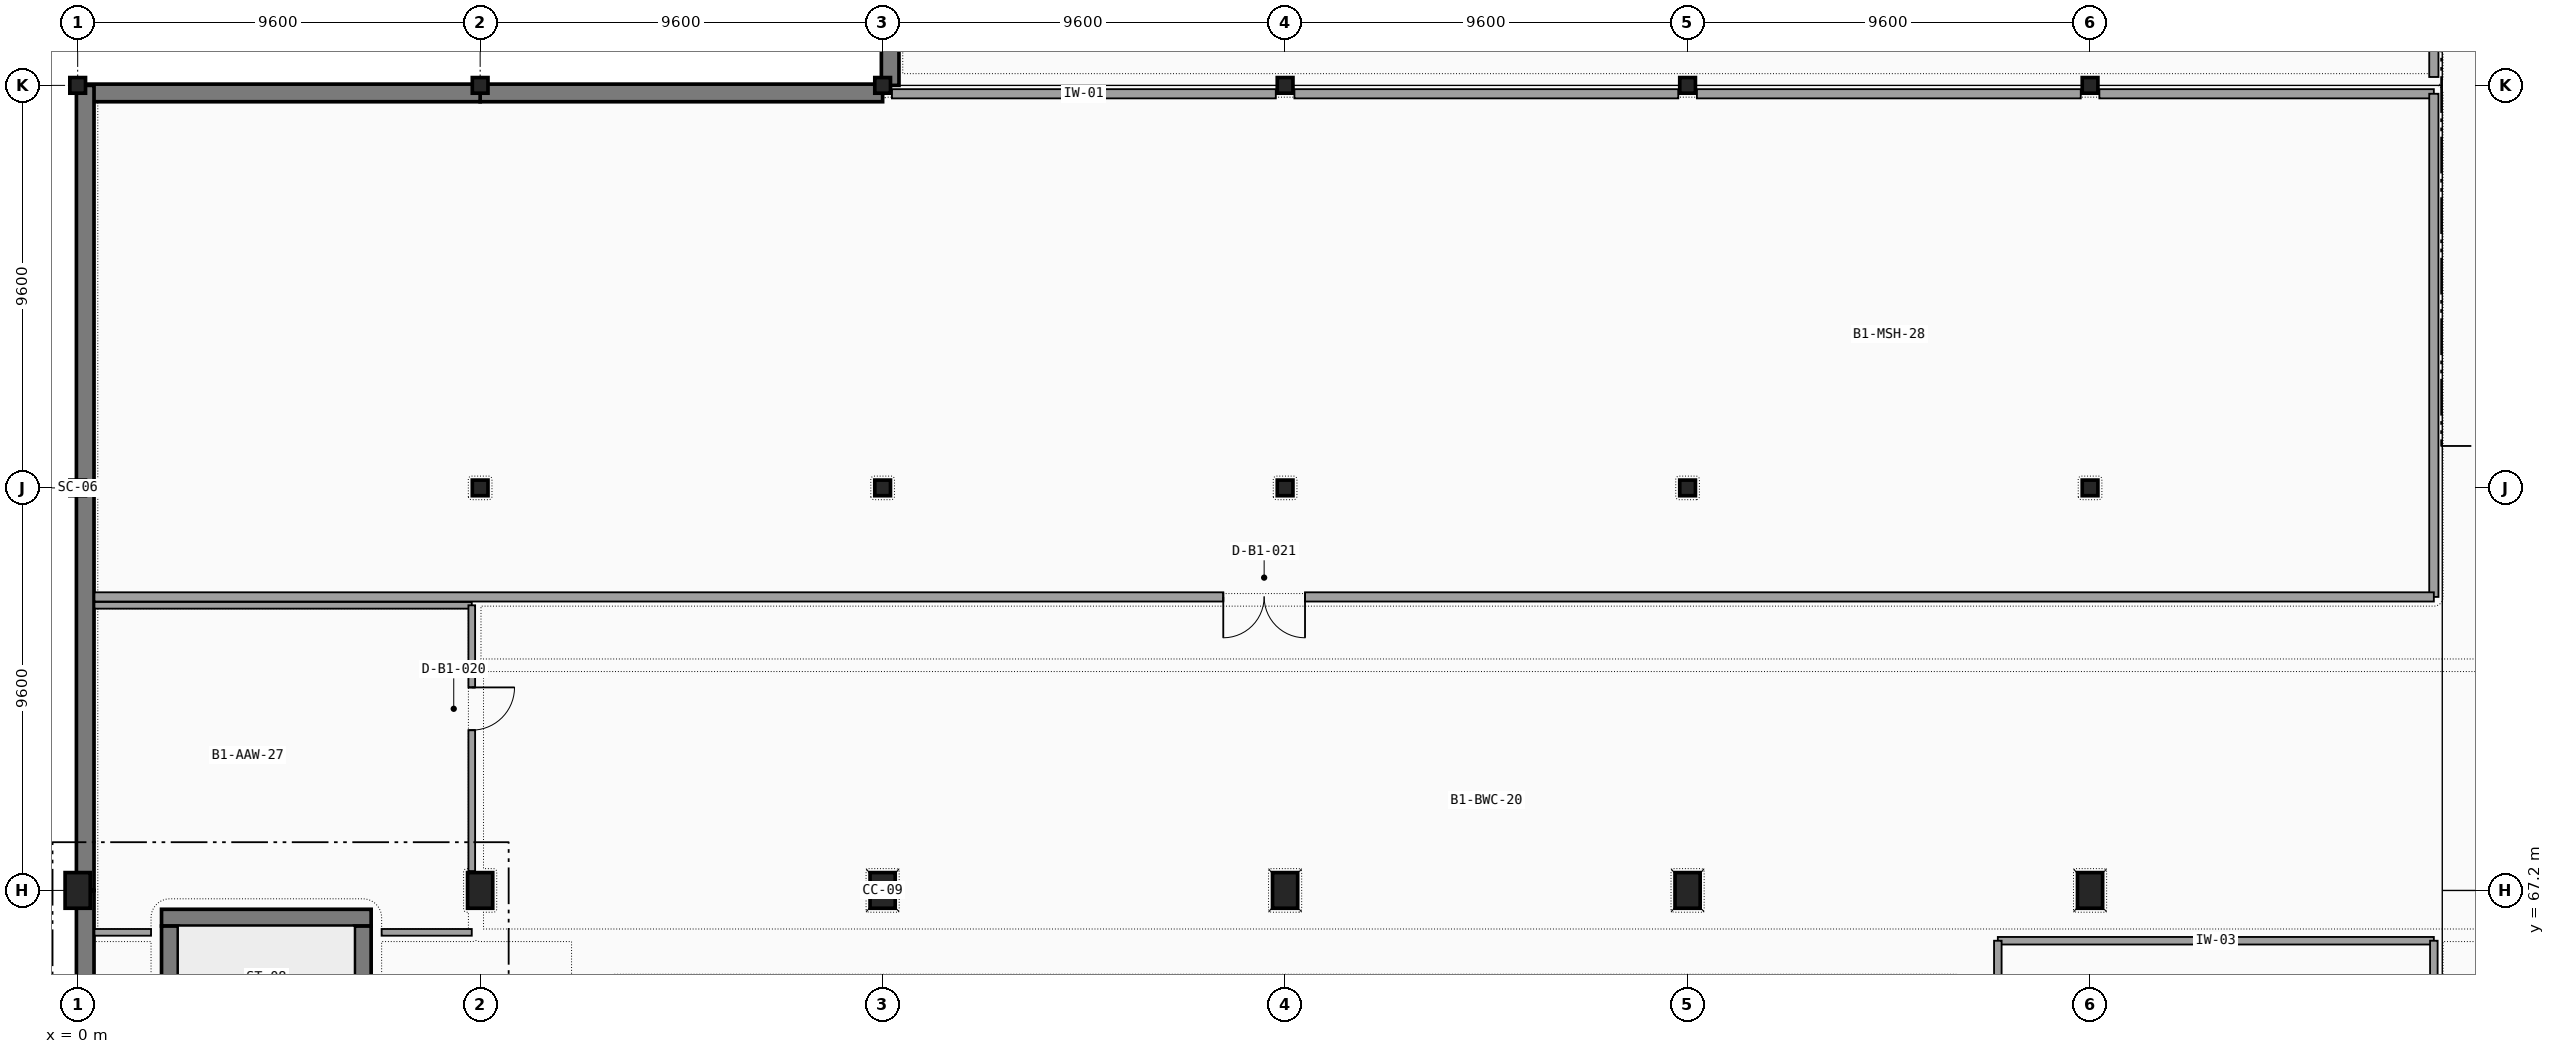
"""IFC4 building model, lengths in metres.
Left out: names, types, materials, properties, quantities, classifications, styles, units other than length and angle.
Written with IfcOpenShell. Run it as: python <this file> out.ifc"""

import sys

from ifc_helpers import new_model, si_unit, direction, frame, frame_2d, origin, origin_2d, place, context, subcontext, project, spatial, rectangle, i_section, extrude, element, fill, save


model = new_model("IFC4")
c1 = context("Model", 3, precision=1e-05, world=origin(), true_north=direction((0.0, 1.0)))
c2 = subcontext(c1, "Body", "Model", "MODEL_VIEW")
j1 = project(units=[si_unit("LENGTHUNIT", "METRE"), si_unit("PLANEANGLEUNIT", "RADIAN")], contexts=[c1])
p1 = place(None, origin())
s1 = spatial("IfcSite", under=j1, at=p1, CompositionType="ELEMENT")
p2 = place(p1, origin())
s2 = spatial("IfcBuilding", under=s1, at=p2, CompositionType="ELEMENT")
p3 = place(p2, frame((0.0, 0.0, -4.8)))
s3 = spatial("IfcBuildingStorey", under=s2, at=p3, CompositionType="ELEMENT", Elevation=-4.8)
p4 = place(p3, frame((0.0, 67.2, 0.0), z_axis=(0.0, 0.0, 1.0), x_axis=(1.0, 0.0, 0.0)))
e1 = element("IfcColumn", 1, at=p4, inside=s3, PredefinedType="COLUMN", context=c2, shape_type="SweptSolid", body=[
    extrude(rectangle(XDim=0.6, YDim=0.85, at=origin_2d()), origin(), (0.0, 0.0, 1.0), 4.8),
])
for number, where, z_axis, x_axis in (
    (2, (0.0, 76.8, 0.0), (0.0, 0.0, 1.0), (1.0, 0.0, 0.0)),
    (3, (0.0, 86.4, 0.0), (0.0, 0.0, 1.0), (1.0, 0.0, 0.0)),
):
    element("IfcColumn", number, at=place(p3, frame(where, z_axis=z_axis, x_axis=x_axis)), inside=s3, PredefinedType="COLUMN", context=c2, shape_type="SweptSolid", body=[
        extrude(i_section(OverallWidth=0.374, OverallDepth=0.372, WebThickness=0.016, FlangeThickness=0.026, FilletRadius=0.015, at=origin_2d()), origin(), (0.0, 0.0, 1.0), 4.8),
    ])
p5 = place(p3, frame((9.6, 67.2, 0.0), z_axis=(0.0, 0.0, 1.0), x_axis=(1.0, 0.0, 0.0)))
e4 = element("IfcColumn", 4, at=p5, inside=s3, PredefinedType="COLUMN", context=c2, shape_type="SweptSolid", body=[
    extrude(rectangle(XDim=0.6, YDim=0.85, at=origin_2d()), origin(), (0.0, 0.0, 1.0), 4.8),
])
for number, where, z_axis, x_axis in (
    (5, (9.6, 76.8, 0.0), (0.0, 0.0, 1.0), (1.0, 0.0, 0.0)),
    (6, (9.6, 86.4, 0.0), (0.0, 0.0, 1.0), (1.0, 0.0, 0.0)),
):
    element("IfcColumn", number, at=place(p3, frame(where, z_axis=z_axis, x_axis=x_axis)), inside=s3, PredefinedType="COLUMN", context=c2, shape_type="SweptSolid", body=[
        extrude(i_section(OverallWidth=0.374, OverallDepth=0.372, WebThickness=0.016, FlangeThickness=0.026, FilletRadius=0.015, at=origin_2d()), origin(), (0.0, 0.0, 1.0), 4.8),
    ])
p6 = place(p3, frame((19.2, 67.2, 0.0), z_axis=(0.0, 0.0, 1.0), x_axis=(1.0, 0.0, 0.0)))
e7 = element("IfcColumn", 7, at=p6, inside=s3, PredefinedType="COLUMN", context=c2, shape_type="SweptSolid", body=[
    extrude(rectangle(XDim=0.6, YDim=0.85, at=origin_2d()), origin(), (0.0, 0.0, 1.0), 4.8),
])
for number, where, z_axis, x_axis in (
    (8, (19.2, 76.8, 0.0), (0.0, 0.0, 1.0), (1.0, 0.0, 0.0)),
    (9, (19.2, 86.4, 0.0), (0.0, 0.0, 1.0), (1.0, 0.0, 0.0)),
):
    element("IfcColumn", number, at=place(p3, frame(where, z_axis=z_axis, x_axis=x_axis)), inside=s3, PredefinedType="COLUMN", context=c2, shape_type="SweptSolid", body=[
        extrude(i_section(OverallWidth=0.374, OverallDepth=0.372, WebThickness=0.016, FlangeThickness=0.026, FilletRadius=0.015, at=origin_2d()), origin(), (0.0, 0.0, 1.0), 4.8),
    ])
p7 = place(p3, frame((28.8, 67.2, 0.0), z_axis=(0.0, 0.0, 1.0), x_axis=(1.0, 0.0, 0.0)))
e10 = element("IfcColumn", 10, at=p7, inside=s3, PredefinedType="COLUMN", context=c2, shape_type="SweptSolid", body=[
    extrude(rectangle(XDim=0.6, YDim=0.85, at=origin_2d()), origin(), (0.0, 0.0, 1.0), 4.8),
])
for number, where, z_axis, x_axis in (
    (11, (28.8, 76.8, 0.0), (0.0, 0.0, 1.0), (1.0, 0.0, 0.0)),
    (12, (28.8, 86.4, 0.0), (0.0, 0.0, 1.0), (1.0, 0.0, 0.0)),
):
    element("IfcColumn", number, at=place(p3, frame(where, z_axis=z_axis, x_axis=x_axis)), inside=s3, PredefinedType="COLUMN", context=c2, shape_type="SweptSolid", body=[
        extrude(i_section(OverallWidth=0.374, OverallDepth=0.372, WebThickness=0.016, FlangeThickness=0.026, FilletRadius=0.015, at=origin_2d()), origin(), (0.0, 0.0, 1.0), 4.8),
    ])
p8 = place(p3, frame((38.4, 67.2, 0.0), z_axis=(0.0, 0.0, 1.0), x_axis=(1.0, 0.0, 0.0)))
e13 = element("IfcColumn", 13, at=p8, inside=s3, PredefinedType="COLUMN", context=c2, shape_type="SweptSolid", body=[
    extrude(rectangle(XDim=0.6, YDim=0.85, at=origin_2d()), origin(), (0.0, 0.0, 1.0), 4.8),
])
for number, where, z_axis, x_axis in (
    (14, (38.4, 76.8, 0.0), (0.0, 0.0, 1.0), (1.0, 0.0, 0.0)),
    (15, (38.4, 86.4, 0.0), (0.0, 0.0, 1.0), (1.0, 0.0, 0.0)),
):
    element("IfcColumn", number, at=place(p3, frame(where, z_axis=z_axis, x_axis=x_axis)), inside=s3, PredefinedType="COLUMN", context=c2, shape_type="SweptSolid", body=[
        extrude(i_section(OverallWidth=0.374, OverallDepth=0.372, WebThickness=0.016, FlangeThickness=0.026, FilletRadius=0.015, at=origin_2d()), origin(), (0.0, 0.0, 1.0), 4.8),
    ])
p9 = place(p3, frame((48.0, 67.2, 0.0), z_axis=(0.0, 0.0, 1.0), x_axis=(1.0, 0.0, 0.0)))
e16 = element("IfcColumn", 16, at=p9, inside=s3, PredefinedType="COLUMN", context=c2, shape_type="SweptSolid", body=[
    extrude(rectangle(XDim=0.6, YDim=0.85, at=origin_2d()), origin(), (0.0, 0.0, 1.0), 4.8),
])
for number, where, z_axis, x_axis in (
    (17, (48.0, 76.8, 0.0), (0.0, 0.0, 1.0), (1.0, 0.0, 0.0)),
    (18, (48.0, 86.4, 0.0), (0.0, 0.0, 1.0), (1.0, 0.0, 0.0)),
):
    element("IfcColumn", number, at=place(p3, frame(where, z_axis=z_axis, x_axis=x_axis)), inside=s3, PredefinedType="COLUMN", context=c2, shape_type="SweptSolid", body=[
        extrude(i_section(OverallWidth=0.374, OverallDepth=0.372, WebThickness=0.016, FlangeThickness=0.026, FilletRadius=0.015, at=origin_2d()), origin(), (0.0, 0.0, 1.0), 4.8),
    ])
p10 = place(p3, frame((19.38, 96.0, 0.0), z_axis=(0.0, 0.0, 1.0), x_axis=(0.0, -1.0, 0.0)))
e19 = element("IfcWall", 19, at=p10, inside=s3, PredefinedType="USERDEFINED", context=c2, shape_type="SweptSolid", body=[
    extrude(rectangle(XDim=9.6, YDim=0.42, at=frame_2d((4.8, 0.0))), origin(), (0.0, 0.0, 1.0), 3.6),
])
p11 = place(p3, frame((19.2, 86.22, 0.0), z_axis=(0.0, 0.0, 1.0), x_axis=(-1.0, 0.0, 0.0)))
e20 = element("IfcWall", 20, at=p11, inside=s3, PredefinedType="USERDEFINED", context=c2, shape_type="SweptSolid", body=[
    extrude(rectangle(XDim=9.6, YDim=0.42, at=frame_2d((4.8, 0.0))), origin(), (0.0, 0.0, 1.0), 3.6),
])
p12 = place(p3, frame((9.6, 86.22, 0.0), z_axis=(0.0, 0.0, 1.0), x_axis=(-1.0, 0.0, 0.0)))
e21 = element("IfcWall", 21, at=p12, inside=s3, PredefinedType="USERDEFINED", context=c2, shape_type="SweptSolid", body=[
    extrude(rectangle(XDim=9.6, YDim=0.42, at=frame_2d((4.8, 0.0))), origin(), (0.0, 0.0, 1.0), 3.573),
])
p13 = place(p3, frame((0.18, 86.4, 0.0), z_axis=(0.0, 0.0, 1.0), x_axis=(0.0, -1.0, 0.0)))
e22 = element("IfcWall", 22, at=p13, inside=s3, PredefinedType="USERDEFINED", context=c2, shape_type="SweptSolid", body=[
    extrude(rectangle(XDim=9.6, YDim=0.42, at=frame_2d((4.8, 0.0))), origin(), (0.0, 0.0, 1.0), 3.573),
])
p14 = place(p3, frame((0.18, 76.8, 0.0), z_axis=(0.0, 0.0, 1.0), x_axis=(0.0, -1.0, 0.0)))
e23 = element("IfcWall", 23, at=p14, inside=s3, PredefinedType="USERDEFINED", context=c2, shape_type="SweptSolid", body=[
    extrude(rectangle(XDim=9.6, YDim=0.42, at=frame_2d((4.8, 0.0))), origin(), (0.0, 0.0, 1.0), 3.573),
])
p15 = place(p3, frame((0.18, 67.2, 0.0), z_axis=(0.0, 0.0, 1.0), x_axis=(0.0, -1.0, 0.0)))
e24 = element("IfcWall", 24, at=p15, inside=s3, PredefinedType="USERDEFINED", context=c2, shape_type="SweptSolid", body=[
    extrude(rectangle(XDim=9.6, YDim=0.42, at=frame_2d((4.8, 0.0))), origin(), (0.0, 0.0, 1.0), 3.573),
])
p16 = place(p3, frame((7.0, 66.55, 0.0), z_axis=(0.0, 0.0, 1.0), x_axis=(-1.0, 0.0, 0.0)))
e25 = element("IfcWall", 25, at=p16, inside=s3, PredefinedType="SHEAR", context=c2, shape_type="SweptSolid", body=[
    extrude(rectangle(XDim=5.0, YDim=0.4, at=frame_2d((2.5, 0.0))), origin(), (0.0, 0.0, 1.0), 4.5),
])
for number, where, z_axis, x_axis in (
    (26, (2.2, 66.35, 0.0), (0.0, 0.0, 1.0), (0.0, -1.0, 0.0)),
    (27, (6.8, 58.2, 0.0), (0.0, 0.0, 1.0), (0.0, 1.0, 0.0)),
):
    element("IfcWall", number, at=place(p3, frame(where, z_axis=z_axis, x_axis=x_axis)), inside=s3, PredefinedType="SHEAR", context=c2, shape_type="SweptSolid", body=[
        extrude(rectangle(XDim=8.15, YDim=0.4, at=frame_2d((4.075, 0.0))), origin(), (0.0, 0.0, 1.0), 4.5),
    ])
p17 = place(p3, frame((45.8, 66.0, 0.0), z_axis=(0.0, 0.0, 1.0), x_axis=(1.0, 0.0, 0.0)))
e28 = element("IfcWall", 28, at=p17, inside=s3, PredefinedType="PARTITIONING", context=c2, shape_type="SweptSolid", body=[
    extrude(rectangle(XDim=10.4, YDim=0.18, at=frame_2d((5.2, 0.0))), origin(), (0.0, 0.0, 1.0), 3.738),
])
p18 = place(p3, frame((56.2, 66.0, 0.0), z_axis=(0.0, 0.0, 1.0), x_axis=(0.0, -1.0, 0.0)))
e29 = element("IfcWall", 29, at=p18, inside=s3, PredefinedType="PARTITIONING", context=c2, shape_type="SweptSolid", body=[
    extrude(rectangle(XDim=11.8, YDim=0.18, at=frame_2d((5.9, 0.0))), origin(), (0.0, 0.0, 1.0), 3.6),
])
p19 = place(p18, frame((2.925, 0.0, 0.0), z_axis=(0.0, 0.0, 1.0), x_axis=(1.0, 0.0, 0.0)))
e30 = element("IfcOpeningElement", 30, at=p19, cuts=e29, PredefinedType="OPENING", context=c2, shape_type="SweptSolid", body=[
    extrude(rectangle(XDim=1.35, YDim=2.25, at=frame_2d((0.675, 1.125))), frame((0.0, 0.1, 0.0), z_axis=(0.0, -1.0, 0.0), x_axis=(1.0, 0.0, 0.0)), (0.0, 0.0, 1.0), 0.2),
])
p20 = place(p3, frame((45.8, 54.2, 0.0), z_axis=(0.0, 0.0, 1.0), x_axis=(0.0, 1.0, 0.0)))
e31 = element("IfcWall", 31, at=p20, inside=s3, PredefinedType="PARTITIONING", context=c2, shape_type="SweptSolid", body=[
    extrude(rectangle(XDim=11.8, YDim=0.18, at=frame_2d((5.9, 0.0))), origin(), (0.0, 0.0, 1.0), 4.5),
])
p21 = place(p3, frame((1.75, 66.2, 0.0), z_axis=(0.0, 0.0, 1.0), x_axis=(-1.0, 0.0, 0.0)))
e32 = element("IfcWall", 32, at=p21, inside=s3, PredefinedType="PARTITIONING", context=c2, shape_type="SweptSolid", body=[
    extrude(rectangle(XDim=1.35, YDim=0.16, at=frame_2d((0.675, 0.0))), origin(), (0.0, 0.0, 1.0), 4.5),
])
p22 = place(p3, frame((0.4, 74.0, 0.0), z_axis=(0.0, 0.0, 1.0), x_axis=(1.0, 0.0, 0.0)))
e33 = element("IfcWall", 33, at=p22, inside=s3, PredefinedType="PARTITIONING", context=c2, shape_type="SweptSolid", body=[
    extrude(rectangle(XDim=9.0, YDim=0.16, at=frame_2d((4.5, 0.0))), origin(), (0.0, 0.0, 1.0), 4.5),
])
p23 = place(p3, frame((9.4, 74.0, 0.0), z_axis=(0.0, 0.0, 1.0), x_axis=(0.0, -1.0, 0.0)))
e34 = element("IfcWall", 34, at=p23, inside=s3, PredefinedType="PARTITIONING", context=c2, shape_type="SweptSolid", body=[
    extrude(rectangle(XDim=6.34, YDim=0.16, at=frame_2d((3.17, 0.0))), origin(), (0.0, 0.0, 1.0), 3.738),
])
p24 = place(p23, frame((1.958, 0.0, 0.0), z_axis=(0.0, 0.0, 1.0), x_axis=(1.0, 0.0, 0.0)))
e35 = element("IfcOpeningElement", 35, at=p24, cuts=e34, PredefinedType="OPENING", context=c2, shape_type="SweptSolid", body=[
    extrude(rectangle(XDim=1.02, YDim=2.15, at=frame_2d((0.51, 1.075))), frame((0.0, 0.09, 0.0), z_axis=(0.0, -1.0, 0.0), x_axis=(1.0, 0.0, 0.0)), (0.0, 0.0, 1.0), 0.18),
])
p25 = place(p3, frame((9.4, 66.2, 0.0), z_axis=(0.0, 0.0, 1.0), x_axis=(-1.0, 0.0, 0.0)))
e36 = element("IfcWall", 36, at=p25, inside=s3, PredefinedType="PARTITIONING", context=c2, shape_type="SweptSolid", body=[
    extrude(rectangle(XDim=2.15, YDim=0.16, at=frame_2d((1.075, 0.0))), origin(), (0.0, 0.0, 1.0), 4.5),
])
p26 = place(p3, frame((19.422, 86.2, 0.0), z_axis=(0.0, 0.0, 1.0), x_axis=(1.0, 0.0, 0.0)))
e37 = element("IfcWall", 37, at=p26, inside=s3, PredefinedType="PARTITIONING", context=c2, shape_type="SweptSolid", body=[
    extrude(rectangle(XDim=9.156, YDim=0.22, at=frame_2d((4.578, 0.0))), origin(), (0.0, 0.0, 1.0), 3.6),
])
for number, where, z_axis, x_axis in (
    (38, (29.022, 86.2, 0.0), (0.0, 0.0, 1.0), (1.0, 0.0, 0.0)),
    (39, (38.622, 86.2, 0.0), (0.0, 0.0, 1.0), (1.0, 0.0, 0.0)),
):
    element("IfcWall", number, at=place(p3, frame(where, z_axis=z_axis, x_axis=x_axis)), inside=s3, PredefinedType="PARTITIONING", context=c2, shape_type="SweptSolid", body=[
        extrude(rectangle(XDim=9.156, YDim=0.22, at=frame_2d((4.578, 0.0))), origin(), (0.0, 0.0, 1.0), 3.6),
    ])
p27 = place(p3, frame((48.222, 86.2, 0.0), z_axis=(0.0, 0.0, 1.0), x_axis=(1.0, 0.0, 0.0)))
e40 = element("IfcWall", 40, at=p27, inside=s3, PredefinedType="PARTITIONING", context=c2, shape_type="SweptSolid", body=[
    extrude(rectangle(XDim=7.978, YDim=0.22, at=frame_2d((3.989, 0.0))), origin(), (0.0, 0.0, 1.0), 3.6),
])
p28 = place(p3, frame((56.2, 86.2, 0.0), z_axis=(0.0, 0.0, 1.0), x_axis=(0.0, -1.0, 0.0)))
e41 = element("IfcWall", 41, at=p28, inside=s3, PredefinedType="PARTITIONING", context=c2, shape_type="SweptSolid", body=[
    extrude(rectangle(XDim=12.0, YDim=0.22, at=frame_2d((6.0, 0.0))), origin(), (0.0, 0.0, 1.0), 3.6),
])
p29 = place(p3, frame((56.2, 74.2, 0.0), z_axis=(0.0, 0.0, 1.0), x_axis=(-1.0, 0.0, 0.0)))
e42 = element("IfcWall", 42, at=p29, inside=s3, PredefinedType="PARTITIONING", context=c2, shape_type="SweptSolid", body=[
    extrude(rectangle(XDim=55.8, YDim=0.22, at=frame_2d((27.9, 0.0))), origin(), (0.0, 0.0, 1.0), 3.738),
])
p30 = place(p29, frame((26.925, 0.0, 0.0), z_axis=(0.0, 0.0, 1.0), x_axis=(1.0, 0.0, 0.0)))
e43 = element("IfcOpeningElement", 43, at=p30, cuts=e42, PredefinedType="OPENING", context=c2, shape_type="SweptSolid", body=[
    extrude(rectangle(XDim=1.95, YDim=2.35, at=frame_2d((0.975, 1.175))), frame((0.0, 0.12, 0.0), z_axis=(0.0, -1.0, 0.0), x_axis=(1.0, 0.0, 0.0)), (0.0, 0.0, 1.0), 0.24),
])
p31 = place(p3, frame((56.2, 105.2, 0.0), z_axis=(0.0, 0.0, 1.0), x_axis=(0.0, -1.0, 0.0)))
e44 = element("IfcWall", 44, at=p31, inside=s3, PredefinedType="PARTITIONING", context=c2, shape_type="SweptSolid", body=[
    extrude(rectangle(XDim=18.6, YDim=0.22, at=frame_2d((9.3, 0.0))), origin(), (0.0, 0.0, 1.0), 3.6),
])
p32 = place(p31, frame((13.025, 0.0, 0.0), z_axis=(0.0, 0.0, 1.0), x_axis=(1.0, 0.0, 0.0)))
e45 = element("IfcOpeningElement", 45, at=p32, cuts=e44, PredefinedType="OPENING", context=c2, shape_type="SweptSolid", body=[
    extrude(rectangle(XDim=1.95, YDim=2.35, at=frame_2d((0.975, 1.175))), frame((0.0, 0.12, 0.0), z_axis=(0.0, -1.0, 0.0), x_axis=(1.0, 0.0, 0.0)), (0.0, 0.0, 1.0), 0.24),
])
p33 = place(p24, origin())
e46 = element("IfcDoor", 46, at=p33, inside=s3, OperationType="SINGLE_SWING_LEFT", PredefinedType="DOOR", context=c2, shape_type="SweptSolid", body=[
    extrude(rectangle(XDim=1.02, YDim=2.15, at=frame_2d((0.51, 1.075))), frame((0.0, 0.025, 0.0), z_axis=(0.0, -1.0, 0.0), x_axis=(1.0, 0.0, 0.0)), (0.0, 0.0, 1.0), 0.05),
])
fill(e35, e46)
p34 = place(p30, origin())
e47 = element("IfcDoor", 47, at=p34, inside=s3, OperationType="DOUBLE_DOOR_SINGLE_SWING", PredefinedType="DOOR", context=c2, shape_type="SweptSolid", body=[
    extrude(rectangle(XDim=1.95, YDim=2.35, at=frame_2d((0.975, 1.175))), frame((0.0, 0.025, 0.0), z_axis=(0.0, -1.0, 0.0), x_axis=(1.0, 0.0, 0.0)), (0.0, 0.0, 1.0), 0.05),
])
fill(e43, e47)
save(model, sys.argv[1])
